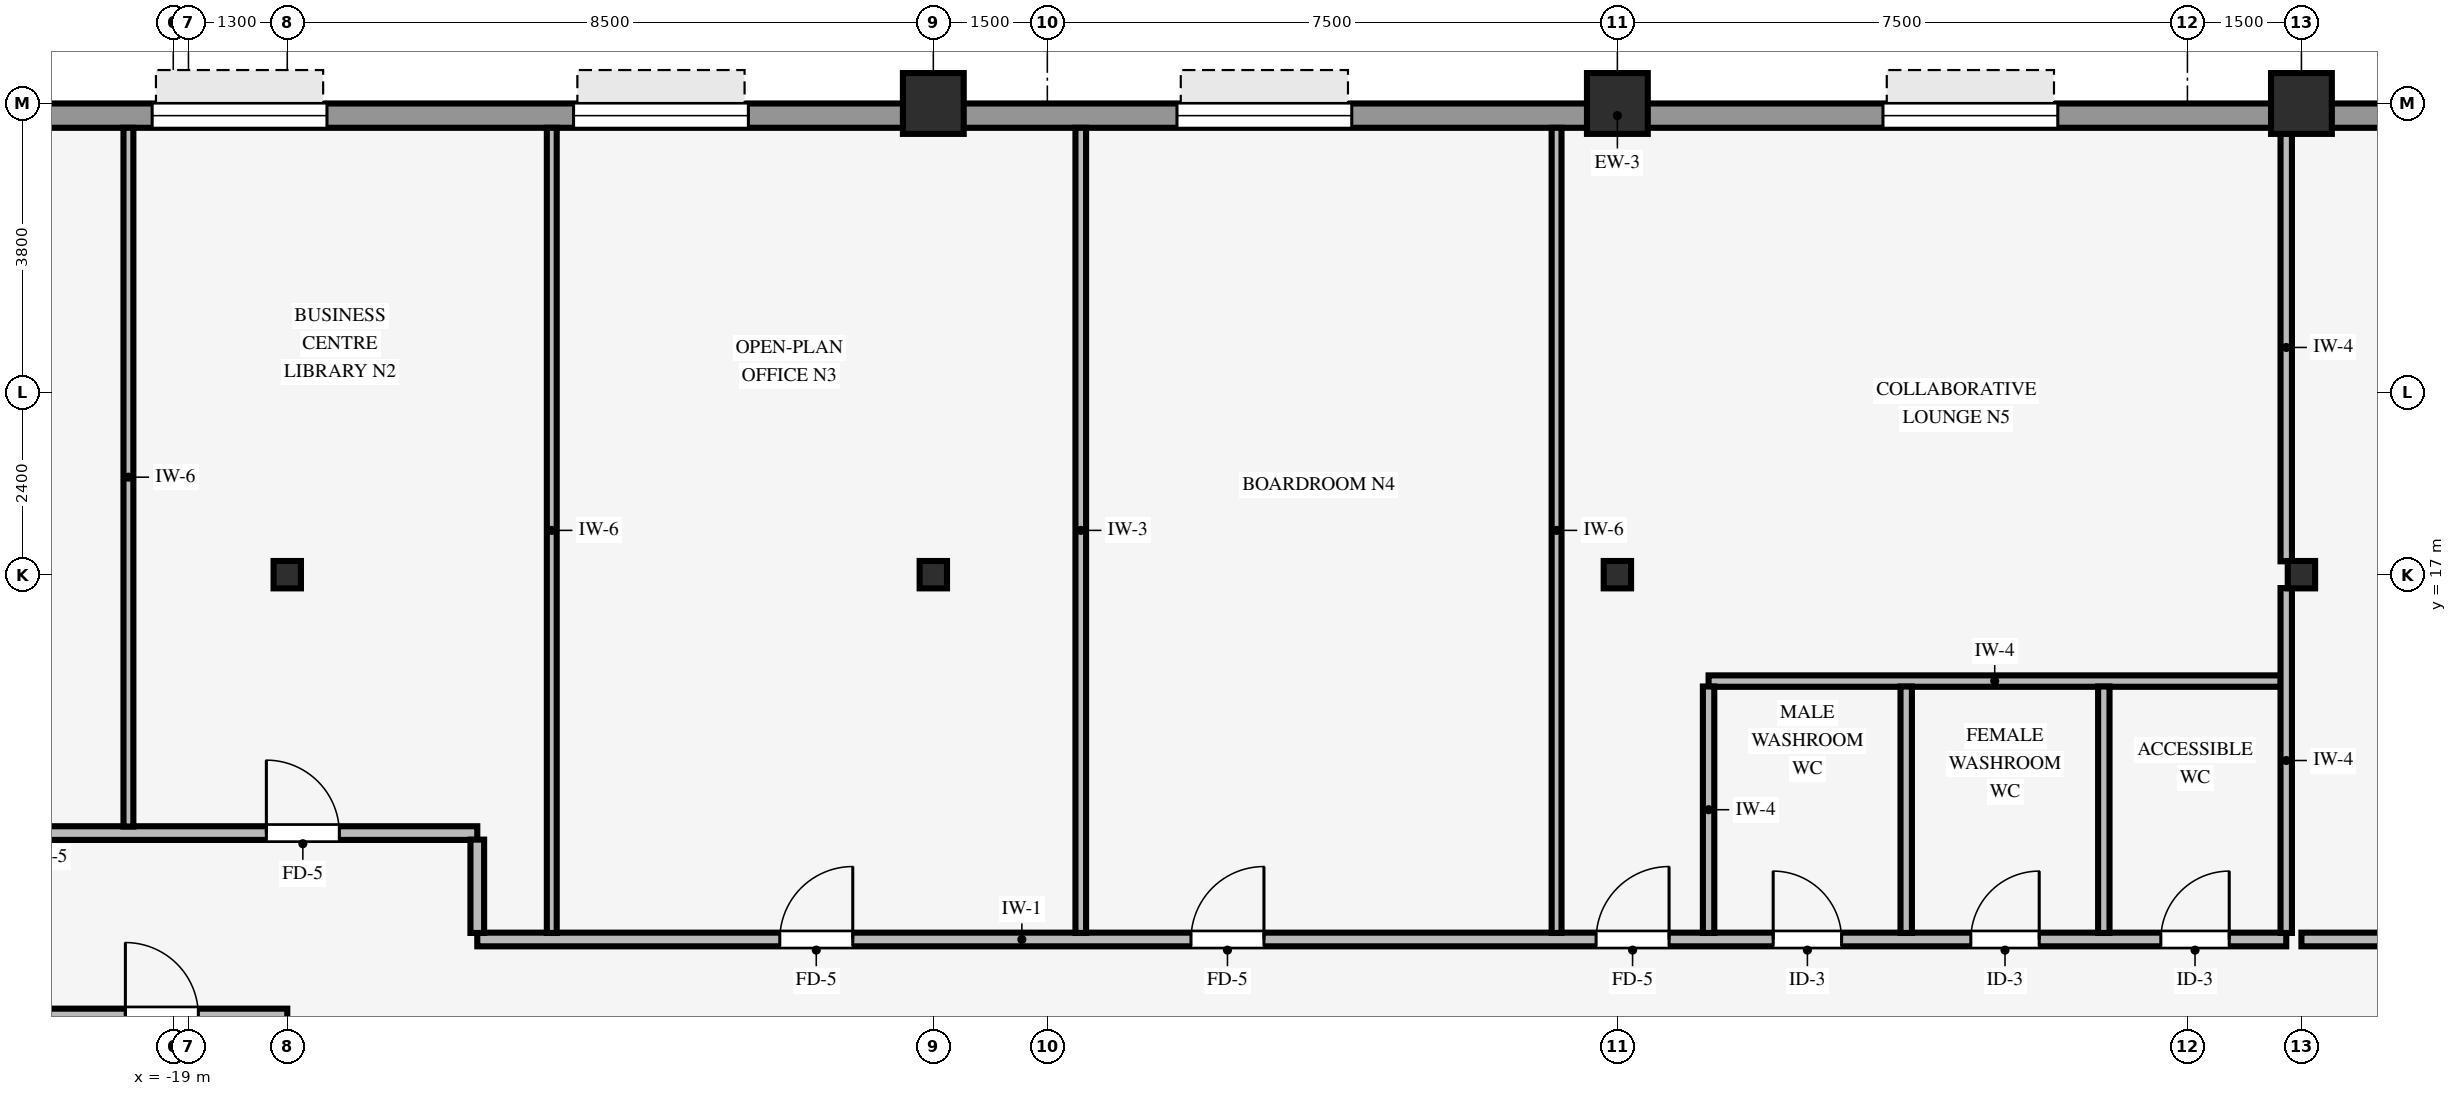
"""IFC4 building model, lengths in metres.
Left out: names, types, materials, properties, quantities, classifications, styles, units other than length and angle.
Written with IfcOpenShell. Run it as: python <this file> out.ifc"""

import sys

from ifc_helpers import new_model, si_unit, direction, frame, frame_2d, origin, origin_2d, place, context, subcontext, project, spatial, rectangle, hollow_rectangle, i_section, extrude, source, transform, mapped, element, fill, save


model = new_model("IFC4")
c1 = context("Model", 3, precision=1e-05, world=origin(), true_north=direction((0.0, 1.0)))
c2 = subcontext(c1, "Body", "Model", "MODEL_VIEW")
j1 = project(units=[si_unit("LENGTHUNIT", "METRE"), si_unit("PLANEANGLEUNIT", "RADIAN")], contexts=[c1])
p1 = place(None, origin())
s1 = spatial("IfcSite", under=j1, at=p1, CompositionType="ELEMENT")
p2 = place(p1, origin())
s2 = spatial("IfcBuilding", under=s1, at=p2, CompositionType="ELEMENT")
p3 = place(p2, frame((0.0, 0.0, 86.0)))
s3 = spatial("IfcBuildingStorey", under=s2, at=p3, CompositionType="ELEMENT", Elevation=86.0)
for number, where, z_axis, x_axis in (
    (1, (-9.0, 23.2, 0.0), (0.0, 0.0, 1.0), (1.0, 0.0, 0.0)),
    (2, (0.0, 23.2, 0.0), (0.0, 0.0, 1.0), (1.0, 0.0, 0.0)),
    (3, (9.0, 23.2, 0.0), (0.0, 0.0, 1.0), (1.0, 0.0, 0.0)),
):
    element("IfcColumn", number, at=place(p3, frame(where, z_axis=z_axis, x_axis=x_axis)), inside=s3, PredefinedType="COLUMN", context=c2, shape_type="SweptSolid", body=[
        extrude(hollow_rectangle(XDim=0.8, YDim=0.8, WallThickness=0.055, InnerFilletRadius=0.055, OuterFilletRadius=0.11, at=origin_2d()), origin(), (0.0, 0.0, 1.0), 3.37),
    ])
for number, where, z_axis, x_axis in (
    (4, (0.0, 17.0, 0.0), (0.0, 0.0, 1.0), (1.0, 0.0, 0.0)),
    (5, (-17.5, 17.0, 0.0), (0.0, 0.0, 1.0), (1.0, 0.0, 0.0)),
    (6, (-9.0, 17.0, 0.0), (0.0, 0.0, 1.0), (1.0, 0.0, 0.0)),
    (7, (9.0, 17.0, 0.0), (0.0, 0.0, 1.0), (1.0, 0.0, 0.0)),
):
    element("IfcColumn", number, at=place(p3, frame(where, z_axis=z_axis, x_axis=x_axis)), inside=s3, PredefinedType="COLUMN", context=c2, shape_type="SweptSolid", body=[
        extrude(i_section(OverallWidth=0.36, OverallDepth=0.36, WebThickness=0.021, FlangeThickness=0.021, FilletRadius=0.018, at=origin_2d()), origin(), (0.0, 0.0, 1.0), 3.37),
    ])
p4 = place(p3, frame((-21.9, 23.04, 0.0), z_axis=(0.0, 0.0, 1.0), x_axis=(1.0, 0.0, 0.0)))
e8 = element("IfcWall", 8, at=p4, inside=s3, PredefinedType="STANDARD", context=c2, shape_type="SweptSolid", body=[
    extrude(rectangle(XDim=43.8, YDim=0.32, at=frame_2d((21.9, 0.0))), origin(), (0.0, 0.0, 1.0), 2.705),
])
p5 = place(p4, frame((2.622, 0.0, 0.8)))
e9 = element("IfcOpeningElement", 9, at=p5, cuts=e8, PredefinedType="OPENING", context=c2, shape_type="SweptSolid", body=[
    extrude(rectangle(XDim=2.3, YDim=1.62, at=frame_2d((1.15, 0.81))), frame((0.0, 0.17, 0.0), z_axis=(0.0, -1.0, 0.0), x_axis=(1.0, 0.0, 0.0)), (0.0, 0.0, 1.0), 0.34),
])
p6 = place(p4, frame((8.167, 0.0, 0.8)))
e10 = element("IfcOpeningElement", 10, at=p6, cuts=e8, PredefinedType="OPENING", context=c2, shape_type="SweptSolid", body=[
    extrude(rectangle(XDim=2.3, YDim=1.62, at=frame_2d((1.15, 0.81))), frame((0.0, 0.17, 0.0), z_axis=(0.0, -1.0, 0.0), x_axis=(1.0, 0.0, 0.0)), (0.0, 0.0, 1.0), 0.34),
])
p7 = place(p4, frame((16.106, 0.0, 0.8)))
e11 = element("IfcOpeningElement", 11, at=p7, cuts=e8, PredefinedType="OPENING", context=c2, shape_type="SweptSolid", body=[
    extrude(rectangle(XDim=2.3, YDim=1.62, at=frame_2d((1.15, 0.81))), frame((0.0, 0.17, 0.0), z_axis=(0.0, -1.0, 0.0), x_axis=(1.0, 0.0, 0.0)), (0.0, 0.0, 1.0), 0.34),
])
p8 = place(p4, frame((25.394, 0.0, 0.8)))
e12 = element("IfcOpeningElement", 12, at=p8, cuts=e8, PredefinedType="OPENING", context=c2, shape_type="SweptSolid", body=[
    extrude(rectangle(XDim=2.3, YDim=1.62, at=frame_2d((1.15, 0.81))), frame((0.0, 0.17, 0.0), z_axis=(0.0, -1.0, 0.0), x_axis=(1.0, 0.0, 0.0)), (0.0, 0.0, 1.0), 0.34),
])
p9 = place(p4, frame((34.683, 0.0, 0.8)))
e13 = element("IfcOpeningElement", 13, at=p9, cuts=e8, PredefinedType="OPENING", context=c2, shape_type="SweptSolid", body=[
    extrude(rectangle(XDim=2.3, YDim=1.62, at=frame_2d((1.15, 0.81))), frame((0.0, 0.17, 0.0), z_axis=(0.0, -1.0, 0.0), x_axis=(1.0, 0.0, 0.0)), (0.0, 0.0, 1.0), 0.34),
])
p10 = place(p4, frame((39.328, 0.0, 0.8)))
e14 = element("IfcOpeningElement", 14, at=p10, cuts=e8, PredefinedType="OPENING", context=c2, shape_type="SweptSolid", body=[
    extrude(rectangle(XDim=2.3, YDim=1.62, at=frame_2d((1.15, 0.81))), frame((0.0, 0.17, 0.0), z_axis=(0.0, -1.0, 0.0), x_axis=(1.0, 0.0, 0.0)), (0.0, 0.0, 1.0), 0.34),
])
p11 = place(p3, frame((-23.68, 11.2, 0.0), z_axis=(0.0, 0.0, 1.0), x_axis=(1.0, 0.0, 0.0)))
e15 = element("IfcWall", 15, at=p11, inside=s3, PredefinedType="PARTITIONING", context=c2, shape_type="SweptSolid", body=[
    extrude(rectangle(XDim=6.18, YDim=0.18, at=frame_2d((3.09, 0.0))), origin(), (0.0, 0.0, 1.0), 3.36),
])
p12 = place(p11, frame((4.05, 0.0, 0.0)))
e16 = element("IfcOpeningElement", 16, at=p12, cuts=e15, PredefinedType="OPENING", context=c2, shape_type="SweptSolid", body=[
    extrude(rectangle(XDim=0.96, YDim=2.1, at=frame_2d((0.48, 1.05))), frame((0.0, 0.1, 0.0), z_axis=(0.0, -1.0, 0.0), x_axis=(1.0, 0.0, 0.0)), (0.0, 0.0, 1.0), 0.2),
])
p13 = place(p3, frame((-15.0, 12.2, 0.0), z_axis=(0.0, 0.0, 1.0), x_axis=(1.0, 0.0, 0.0)))
e17 = element("IfcWall", 17, at=p13, inside=s3, PredefinedType="PARTITIONING", context=c2, shape_type="SweptSolid", body=[
    extrude(rectangle(XDim=23.8, YDim=0.18, at=frame_2d((11.9, 0.0))), origin(), (0.0, 0.0, 1.0), 3.36),
])
p14 = place(p13, frame((3.98, 0.0, 0.0)))
e18 = element("IfcOpeningElement", 18, at=p14, cuts=e17, PredefinedType="OPENING", context=c2, shape_type="SweptSolid", body=[
    extrude(rectangle(XDim=0.96, YDim=2.1, at=frame_2d((0.48, 1.05))), frame((0.0, 0.1, 0.0), z_axis=(0.0, -1.0, 0.0), x_axis=(1.0, 0.0, 0.0)), (0.0, 0.0, 1.0), 0.2),
])
p15 = place(p13, frame((9.39, 0.0, 0.0)))
e19 = element("IfcOpeningElement", 19, at=p15, cuts=e17, PredefinedType="OPENING", context=c2, shape_type="SweptSolid", body=[
    extrude(rectangle(XDim=0.96, YDim=2.1, at=frame_2d((0.48, 1.05))), frame((0.0, 0.1, 0.0), z_axis=(0.0, -1.0, 0.0), x_axis=(1.0, 0.0, 0.0)), (0.0, 0.0, 1.0), 0.2),
])
p16 = place(p13, frame((19.65, 0.0, 0.0)))
e20 = element("IfcOpeningElement", 20, at=p16, cuts=e17, PredefinedType="OPENING", context=c2, shape_type="SweptSolid", body=[
    extrude(rectangle(XDim=0.9, YDim=2.1, at=frame_2d((0.45, 1.05))), frame((0.0, 0.1, 0.0), z_axis=(0.0, -1.0, 0.0), x_axis=(1.0, 0.0, 0.0)), (0.0, 0.0, 1.0), 0.2),
])
p17 = place(p13, frame((17.05, 0.0, 0.0)))
e21 = element("IfcOpeningElement", 21, at=p17, cuts=e17, PredefinedType="OPENING", context=c2, shape_type="SweptSolid", body=[
    extrude(rectangle(XDim=0.9, YDim=2.1, at=frame_2d((0.45, 1.05))), frame((0.0, 0.1, 0.0), z_axis=(0.0, -1.0, 0.0), x_axis=(1.0, 0.0, 0.0)), (0.0, 0.0, 1.0), 0.2),
])
p18 = place(p13, frame((22.15, 0.0, 0.0)))
e22 = element("IfcOpeningElement", 22, at=p18, cuts=e17, PredefinedType="OPENING", context=c2, shape_type="SweptSolid", body=[
    extrude(rectangle(XDim=0.9, YDim=2.1, at=frame_2d((0.45, 1.05))), frame((0.0, 0.1, 0.0), z_axis=(0.0, -1.0, 0.0), x_axis=(1.0, 0.0, 0.0)), (0.0, 0.0, 1.0), 0.2),
])
p19 = place(p13, frame((14.72, 0.0, 0.0)))
e23 = element("IfcOpeningElement", 23, at=p19, cuts=e17, PredefinedType="OPENING", context=c2, shape_type="SweptSolid", body=[
    extrude(rectangle(XDim=0.96, YDim=2.1, at=frame_2d((0.48, 1.05))), frame((0.0, 0.1, 0.0), z_axis=(0.0, -1.0, 0.0), x_axis=(1.0, 0.0, 0.0)), (0.0, 0.0, 1.0), 0.2),
])
p20 = place(p3, frame((9.0, 12.2, 0.0), z_axis=(0.0, 0.0, 1.0), x_axis=(1.0, 0.0, 0.0)))
e24 = element("IfcWall", 24, at=p20, inside=s3, PredefinedType="PARTITIONING", context=c2, shape_type="SweptSolid", body=[
    extrude(rectangle(XDim=6.0, YDim=0.18, at=frame_2d((3.0, 0.0))), origin(), (0.0, 0.0, 1.0), 3.36),
])
p21 = place(p20, frame((2.52, 0.0, 0.0)))
e25 = element("IfcOpeningElement", 25, at=p21, cuts=e24, PredefinedType="OPENING", context=c2, shape_type="SweptSolid", body=[
    extrude(rectangle(XDim=0.96, YDim=2.1, at=frame_2d((0.48, 1.05))), frame((0.0, 0.1, 0.0), z_axis=(0.0, -1.0, 0.0), x_axis=(1.0, 0.0, 0.0)), (0.0, 0.0, 1.0), 0.2),
])
p22 = place(p3, frame((-20.8, 13.6, 0.0), z_axis=(0.0, 0.0, 1.0), x_axis=(1.0, 0.0, 0.0)))
e26 = element("IfcWall", 26, at=p22, inside=s3, PredefinedType="PARTITIONING", context=c2, shape_type="SweptSolid", body=[
    extrude(rectangle(XDim=5.8, YDim=0.18, at=frame_2d((2.9, 0.0))), origin(), (0.0, 0.0, 1.0), 2.998),
])
p23 = place(p22, frame((3.025, 0.0, 0.0)))
e27 = element("IfcOpeningElement", 27, at=p23, cuts=e26, PredefinedType="OPENING", context=c2, shape_type="SweptSolid", body=[
    extrude(rectangle(XDim=0.96, YDim=2.1, at=frame_2d((0.48, 1.05))), frame((0.0, 0.1, 0.0), z_axis=(0.0, -1.0, 0.0), x_axis=(1.0, 0.0, 0.0)), (0.0, 0.0, 1.0), 0.2),
])
p24 = place(p3, frame((1.2, 15.6, 0.0), z_axis=(0.0, 0.0, 1.0), x_axis=(1.0, 0.0, 0.0)))
e28 = element("IfcWall", 28, at=p24, inside=s3, PredefinedType="PARTITIONING", context=c2, shape_type="SweptSolid", body=[
    extrude(rectangle(XDim=7.529, YDim=0.15, at=frame_2d((3.765, 0.0))), origin(), (0.0, 0.0, 1.0), 3.36),
])
p25 = place(p3, frame((-19.59, 13.686, 0.0), z_axis=(0.0, 0.0, 1.0), x_axis=(0.0, 1.0, 0.0)))
e29 = element("IfcWall", 29, at=p25, inside=s3, PredefinedType="PARTITIONING", context=c2, shape_type="SweptSolid", body=[
    extrude(rectangle(XDim=9.194, YDim=0.13, at=frame_2d((4.597, 0.0))), origin(), (0.0, 0.0, 1.0), 3.36),
])
p26 = place(p3, frame((-15.0, 12.286, 0.0), z_axis=(0.0, 0.0, 1.0), x_axis=(0.0, 1.0, 0.0)))
e30 = element("IfcWall", 30, at=p26, inside=s3, PredefinedType="PARTITIONING", context=c2, shape_type="SweptSolid", body=[
    extrude(rectangle(XDim=1.228, YDim=0.18, at=frame_2d((0.614, 0.0))), origin(), (0.0, 0.0, 1.0), 3.36),
])
p27 = place(p3, frame((-14.02, 12.286, 0.0), z_axis=(0.0, 0.0, 1.0), x_axis=(0.0, 1.0, 0.0)))
e31 = element("IfcWall", 31, at=p27, inside=s3, PredefinedType="PARTITIONING", context=c2, shape_type="SweptSolid", body=[
    extrude(rectangle(XDim=10.594, YDim=0.13, at=frame_2d((5.297, 0.0))), origin(), (0.0, 0.0, 1.0), 3.36),
])
p28 = place(p3, frame((-7.06, 12.286, 0.0), z_axis=(0.0, 0.0, 1.0), x_axis=(0.0, 1.0, 0.0)))
e32 = element("IfcWall", 32, at=p28, inside=s3, PredefinedType="PARTITIONING", context=c2, shape_type="SweptSolid", body=[
    extrude(rectangle(XDim=10.594, YDim=0.14, at=frame_2d((5.297, 0.0))), origin(), (0.0, 0.0, 1.0), 3.36),
])
p29 = place(p3, frame((-0.8, 12.286, 0.0), z_axis=(0.0, 0.0, 1.0), x_axis=(0.0, 1.0, 0.0)))
e33 = element("IfcWall", 33, at=p29, inside=s3, PredefinedType="PARTITIONING", context=c2, shape_type="SweptSolid", body=[
    extrude(rectangle(XDim=10.594, YDim=0.13, at=frame_2d((5.297, 0.0))), origin(), (0.0, 0.0, 1.0), 3.36),
])
for number, where, z_axis, x_axis in (
    (34, (1.2, 12.286, 0.0), (0.0, 0.0, 1.0), (0.0, 1.0, 0.0)),
    (35, (3.8, 12.286, 0.0), (0.0, 0.0, 1.0), (0.0, 1.0, 0.0)),
    (36, (6.4, 12.286, 0.0), (0.0, 0.0, 1.0), (0.0, 1.0, 0.0)),
):
    element("IfcWall", number, at=place(p3, frame(where, z_axis=z_axis, x_axis=x_axis)), inside=s3, PredefinedType="PARTITIONING", context=c2, shape_type="SweptSolid", body=[
        extrude(rectangle(XDim=3.243, YDim=0.15, at=frame_2d((1.622, 0.0))), origin(), (0.0, 0.0, 1.0), 3.36),
    ])
p30 = place(p3, frame((8.8, 12.286, 0.0), z_axis=(0.0, 0.0, 1.0), x_axis=(0.0, 1.0, 0.0)))
e37 = element("IfcWall", 37, at=p30, inside=s3, PredefinedType="PARTITIONING", context=c2, shape_type="SweptSolid", body=[
    extrude(rectangle(XDim=4.538, YDim=0.15, at=frame_2d((2.269, 0.0))), origin(), (0.0, 0.0, 1.0), 2.738),
])
p31 = place(p3, frame((8.8, 17.176, 0.0), z_axis=(0.0, 0.0, 1.0), x_axis=(0.0, 1.0, 0.0)))
e38 = element("IfcWall", 38, at=p31, inside=s3, PredefinedType="PARTITIONING", context=c2, shape_type="SweptSolid", body=[
    extrude(rectangle(XDim=5.628, YDim=0.15, at=frame_2d((2.814, 0.0))), origin(), (0.0, 0.0, 1.0), 2.738),
])
m1 = source(origin(), c2, "Body", "SweptSolid", [
    extrude(rectangle(XDim=2.3, YDim=1.62, at=frame_2d((1.15, 0.81))), frame((0.0, 0.03, 0.0), z_axis=(0.0, -1.0, 0.0), x_axis=(1.0, 0.0, 0.0)), (0.0, 0.0, 1.0), 0.06),
])
p32 = place(p5, origin())
e39 = element("IfcWindow", 39, at=p32, inside=s3, PartitioningType="SINGLE_PANEL", PredefinedType="WINDOW", context=c2, shape_type="MappedRepresentation", body=[
    mapped(m1, transform((0.0, 0.0, 0.0), scale=1.0)),
])
fill(e9, e39)
p33 = place(p6, origin())
e40 = element("IfcWindow", 40, at=p33, inside=s3, PartitioningType="SINGLE_PANEL", PredefinedType="WINDOW", context=c2, shape_type="MappedRepresentation", body=[
    mapped(m1, transform((0.0, 0.0, 0.0), scale=1.0)),
])
fill(e10, e40)
p34 = place(p7, origin())
e41 = element("IfcWindow", 41, at=p34, inside=s3, PartitioningType="SINGLE_PANEL", PredefinedType="WINDOW", context=c2, shape_type="MappedRepresentation", body=[
    mapped(m1, transform((0.0, 0.0, 0.0), scale=1.0)),
])
fill(e11, e41)
p35 = place(p8, origin())
e42 = element("IfcWindow", 42, at=p35, inside=s3, PartitioningType="SINGLE_PANEL", PredefinedType="WINDOW", context=c2, shape_type="MappedRepresentation", body=[
    mapped(m1, transform((0.0, 0.0, 0.0), scale=1.0)),
])
fill(e12, e42)
m2 = source(origin(), c2, "Body", "SweptSolid", [
    extrude(rectangle(XDim=0.96, YDim=2.1, at=frame_2d((0.48, 1.05))), frame((0.0, 0.025, 0.0), z_axis=(0.0, -1.0, 0.0), x_axis=(1.0, 0.0, 0.0)), (0.0, 0.0, 1.0), 0.05),
])
p36 = place(p14, origin())
e43 = element("IfcDoor", 43, at=p36, inside=s3, OperationType="SINGLE_SWING_RIGHT", PredefinedType="DOOR", context=c2, shape_type="MappedRepresentation", body=[
    mapped(m2, transform((0.0, 0.0, 0.0), scale=1.0)),
])
fill(e18, e43)
p37 = place(p23, origin())
e44 = element("IfcDoor", 44, at=p37, inside=s3, OperationType="SINGLE_SWING_LEFT", PredefinedType="DOOR", context=c2, shape_type="MappedRepresentation", body=[
    mapped(m2, transform((0.0, 0.0, 0.0), scale=1.0)),
])
fill(e27, e44)
p38 = place(p15, origin())
e45 = element("IfcDoor", 45, at=p38, inside=s3, OperationType="SINGLE_SWING_RIGHT", PredefinedType="DOOR", context=c2, shape_type="MappedRepresentation", body=[
    mapped(m2, transform((0.0, 0.0, 0.0), scale=1.0)),
])
fill(e19, e45)
p39 = place(p12, origin())
e46 = element("IfcDoor", 46, at=p39, inside=s3, OperationType="SINGLE_SWING_LEFT", PredefinedType="DOOR", context=c2, shape_type="MappedRepresentation", body=[
    mapped(m2, transform((0.0, 0.0, 0.0), scale=1.0)),
])
fill(e16, e46)
m3 = source(origin(), c2, "Body", "SweptSolid", [
    extrude(rectangle(XDim=0.9, YDim=2.1, at=frame_2d((0.45, 1.05))), frame((0.0, 0.025, 0.0), z_axis=(0.0, -1.0, 0.0), x_axis=(1.0, 0.0, 0.0)), (0.0, 0.0, 1.0), 0.05),
])
p40 = place(p16, origin())
e47 = element("IfcDoor", 47, at=p40, inside=s3, OperationType="SINGLE_SWING_RIGHT", PredefinedType="DOOR", context=c2, shape_type="MappedRepresentation", body=[
    mapped(m3, transform((0.0, 0.0, 0.0), scale=1.0)),
])
fill(e20, e47)
p41 = place(p17, origin())
e48 = element("IfcDoor", 48, at=p41, inside=s3, OperationType="SINGLE_SWING_LEFT", PredefinedType="DOOR", context=c2, shape_type="MappedRepresentation", body=[
    mapped(m3, transform((0.0, 0.0, 0.0), scale=1.0)),
])
fill(e21, e48)
p42 = place(p18, origin())
e49 = element("IfcDoor", 49, at=p42, inside=s3, OperationType="SINGLE_SWING_RIGHT", PredefinedType="DOOR", context=c2, shape_type="MappedRepresentation", body=[
    mapped(m3, transform((0.0, 0.0, 0.0), scale=1.0)),
])
fill(e22, e49)
p43 = place(p19, origin())
e50 = element("IfcDoor", 50, at=p43, inside=s3, OperationType="SINGLE_SWING_RIGHT", PredefinedType="DOOR", context=c2, shape_type="MappedRepresentation", body=[
    mapped(m2, transform((0.0, 0.0, 0.0), scale=1.0)),
])
fill(e23, e50)
save(model, sys.argv[1])
